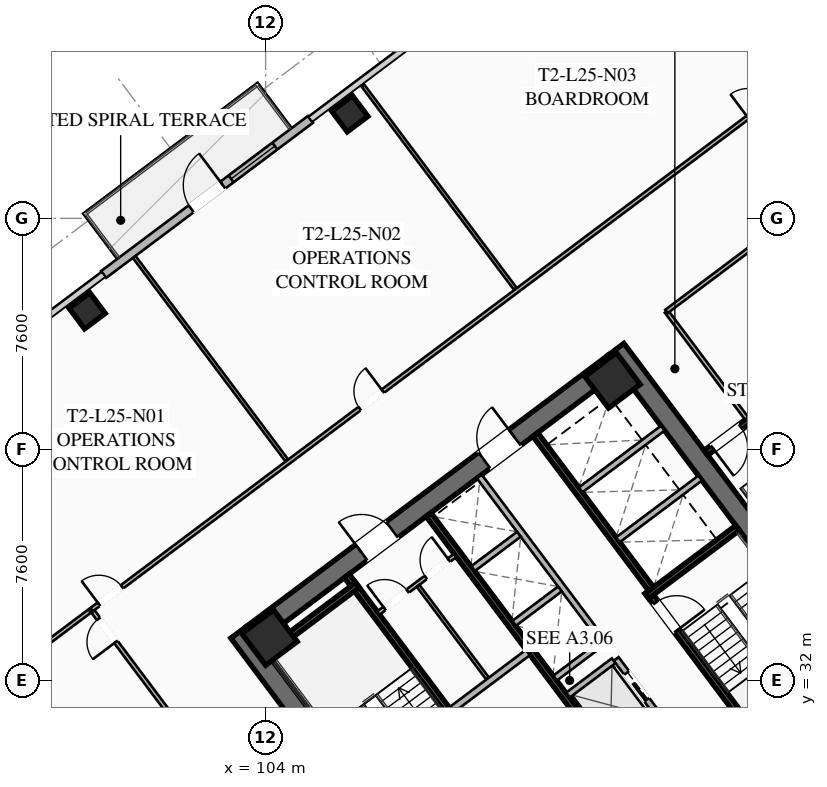
"""IFC4 building model, lengths in metres.
Left out: names, types, materials, properties, quantities, classifications, styles, units other than length and angle.
Written with IfcOpenShell. Run it as: python <this file> out.ifc"""

import sys

from ifc_helpers import new_model, si_unit, direction, frame, frame_2d, origin, origin_2d, place, context, subcontext, project, spatial, rectangle, hollow_rectangle, extrude, element, fill, save


model = new_model("IFC4")
c1 = context("Model", 3, precision=1e-05, world=origin(), true_north=direction((0.0, 1.0)))
c2 = subcontext(c1, "Body", "Model", "MODEL_VIEW")
j1 = project(units=[si_unit("LENGTHUNIT", "METRE"), si_unit("PLANEANGLEUNIT", "RADIAN")], contexts=[c1])
p1 = place(None, origin())
s1 = spatial("IfcSite", under=j1, at=p1, CompositionType="ELEMENT")
p2 = place(p1, origin())
s2 = spatial("IfcBuilding", under=s1, at=p2, CompositionType="ELEMENT")
p3 = place(p2, frame((0.0, 0.0, 95.6)))
s3 = spatial("IfcBuildingStorey", under=s2, at=p3, CompositionType="ELEMENT", Elevation=95.6)
for number, where, z_axis, x_axis in (
    (1, (112.476, 21.107, 0.0), (0.0, 0.0, 1.0), (-0.6, 0.8, 0.0)),
    (2, (115.524, 42.893, 0.0), (0.0, 0.0, 1.0), (0.6, -0.8, 0.0)),
):
    element("IfcWall", number, at=place(p3, frame(where, z_axis=z_axis, x_axis=x_axis)), inside=s3, PredefinedType="SHEAR", context=c2, shape_type="SweptSolid", body=[
        extrude(rectangle(XDim=15.6, YDim=0.65, at=frame_2d((7.8, 0.0))), origin(), (0.0, 0.0, 1.0), 3.55),
    ])
p4 = place(p3, frame((103.571, 33.522, 0.0), z_axis=(0.0, 0.0, 1.0), x_axis=(0.799998028465, 0.600002628705, 0.0)))
e3 = element("IfcWall", 3, at=p4, inside=s3, PredefinedType="SHEAR", context=c2, shape_type="SweptSolid", body=[
    extrude(rectangle(XDim=14.86, YDim=0.65, at=frame_2d((7.43, 0.0))), origin(), (0.0, 0.0, 1.0), 3.55),
])
p5 = place(p4, frame((4.48, 0.0, 0.0)))
e4 = element("IfcOpeningElement", 4, at=p5, cuts=e3, PredefinedType="OPENING", context=c2, shape_type="SweptSolid", body=[
    extrude(rectangle(XDim=1.25, YDim=2.25, at=frame_2d((0.625, 1.125))), frame((0.0, 0.335, 0.0), z_axis=(0.0, -1.0, 0.0), x_axis=(1.0, 0.0, 0.0)), (0.0, 0.0, 1.0), 0.67),
])
p6 = place(p4, frame((9.53, 0.0, 0.0)))
e5 = element("IfcOpeningElement", 5, at=p6, cuts=e3, PredefinedType="OPENING", context=c2, shape_type="SweptSolid", body=[
    extrude(rectangle(XDim=1.25, YDim=2.25, at=frame_2d((0.625, 1.125))), frame((0.0, 0.335, 0.0), z_axis=(0.0, -1.0, 0.0), x_axis=(1.0, 0.0, 0.0)), (0.0, 0.0, 1.0), 0.67),
])
for number, where, z_axis, x_axis in (
    (6, (115.41, 41.87, 0.0), (0.0, 0.0, 1.0), (0.8, 0.6, 0.0)),
    (7, (104.13, 33.41, 0.0), (0.0, 0.0, 1.0), (0.8, 0.6, 0.0)),
):
    element("IfcColumn", number, at=place(p3, frame(where, z_axis=z_axis, x_axis=x_axis)), inside=s3, PredefinedType="COLUMN", context=c2, shape_type="SweptSolid", body=[
        extrude(hollow_rectangle(XDim=1.3, YDim=1.3, WallThickness=0.05, at=origin_2d()), origin(), (0.0, 0.0, 1.0), 3.35),
    ])
for number, where, z_axis, x_axis in (
    (8, (106.77, 50.64, 0.0), (0.0, 0.0, 1.0), (0.8, 0.6, 0.0)),
    (9, (98.13, 44.16, 0.0), (0.0, 0.0, 1.0), (0.8, 0.6, 0.0)),
):
    element("IfcColumn", number, at=place(p3, frame(where, z_axis=z_axis, x_axis=x_axis)), inside=s3, PredefinedType="COLUMN", context=c2, shape_type="SweptSolid", body=[
        extrude(hollow_rectangle(XDim=0.85, YDim=0.85, WallThickness=0.035, at=origin_2d()), origin(), (0.0, 0.0, 1.0), 3.35),
    ])
p7 = place(p3, frame((98.672, 45.354, 0.0), z_axis=(0.0, 0.0, 1.0), x_axis=(0.799986212866, 0.600018382406, 0.0)))
e10 = element("IfcWall", 10, at=p7, inside=s3, PredefinedType="SOLIDWALL", context=c2, shape_type="SweptSolid", body=[
    extrude(rectangle(XDim=8.5, YDim=0.28, at=frame_2d((4.25, 0.0))), origin(), (0.0, 0.0, 1.0), 3.35),
])
p8 = place(p7, frame((3.6, 0.0, 0.0)))
e11 = element("IfcOpeningElement", 11, at=p8, cuts=e10, PredefinedType="OPENING", context=c2, shape_type="SweptSolid", body=[
    extrude(rectangle(XDim=1.3, YDim=2.15, at=frame_2d((0.65, 1.075))), frame((0.0, 0.15, 0.0), z_axis=(0.0, -1.0, 0.0), x_axis=(1.0, 0.0, 0.0)), (0.0, 0.0, 1.0), 0.3),
])
p9 = place(p7, frame((5.24, 0.0, 0.85)))
e12 = element("IfcOpeningElement", 12, at=p9, cuts=e10, PredefinedType="OPENING", context=c2, shape_type="SweptSolid", body=[
    extrude(rectangle(XDim=1.8, YDim=1.92, at=frame_2d((0.9, 0.96))), frame((0.0, 0.15, 0.0), z_axis=(0.0, -1.0, 0.0), x_axis=(1.0, 0.0, 0.0)), (0.0, 0.0, 1.0), 0.3),
])
p10 = place(p3, frame((111.44, 29.08, 0.0), z_axis=(0.0, 0.0, 1.0), x_axis=(-0.600009827119, 0.799992629566, 0.0)))
e13 = element("IfcWall", 13, at=p10, inside=s3, PredefinedType="SHEAR", context=c2, shape_type="SweptSolid", body=[
    extrude(rectangle(XDim=7.95, YDim=0.2, at=frame_2d((3.975, 0.0))), origin(), (0.0, 0.0, 1.0), 3.35),
])
p11 = place(p10, frame((0.45, 0.0, 0.0)))
e14 = element("IfcOpeningElement", 14, at=p11, cuts=e13, PredefinedType="OPENING", context=c2, shape_type="SweptSolid", body=[
    extrude(rectangle(XDim=1.15, YDim=2.2, at=frame_2d((0.575, 1.1))), frame((0.0, 0.11, 0.0), z_axis=(0.0, -1.0, 0.0), x_axis=(1.0, 0.0, 0.0)), (0.0, 0.0, 1.0), 0.22),
])
p12 = place(p3, frame((104.036, 32.902, 0.0), z_axis=(0.0, 0.0, 1.0), x_axis=(0.800039270442, 0.59994763584, 0.0)))
e15 = element("IfcWall", 15, at=p12, inside=s3, PredefinedType="SHEAR", context=c2, shape_type="SweptSolid", body=[
    extrude(rectangle(XDim=3.73, YDim=0.2, at=frame_2d((1.865, 0.0))), origin(), (0.0, 0.0, 1.0), 3.35),
])
p13 = place(p3, frame((116.56, 34.92, 0.0), z_axis=(0.0, 0.0, 1.0), x_axis=(0.600009827119, -0.799992629566, 0.0)))
e16 = element("IfcWall", 16, at=p13, inside=s3, PredefinedType="SHEAR", context=c2, shape_type="SweptSolid", body=[
    extrude(rectangle(XDim=7.95, YDim=0.2, at=frame_2d((3.975, 0.0))), origin(), (0.0, 0.0, 1.0), 3.35),
])
p14 = place(p13, frame((0.45, 0.0, 0.0)))
e17 = element("IfcOpeningElement", 17, at=p14, cuts=e16, PredefinedType="OPENING", context=c2, shape_type="SweptSolid", body=[
    extrude(rectangle(XDim=1.15, YDim=2.2, at=frame_2d((0.575, 1.1))), frame((0.0, 0.11, 0.0), z_axis=(0.0, -1.0, 0.0), x_axis=(1.0, 0.0, 0.0)), (0.0, 0.0, 1.0), 0.22),
])
p15 = place(p3, frame((116.54, 34.78, 0.0), z_axis=(0.0, 0.0, 1.0), x_axis=(0.799984290658, 0.600020945218, 0.0)))
e18 = element("IfcWall", 18, at=p15, inside=s3, PredefinedType="SHEAR", context=c2, shape_type="SweptSolid", body=[
    extrude(rectangle(XDim=3.73, YDim=0.2, at=frame_2d((1.865, 0.0))), origin(), (0.0, 0.0, 1.0), 3.35),
])
p16 = place(p3, frame((117.938, 26.016, 0.0), z_axis=(0.0, 0.0, 1.0), x_axis=(-0.600005463273, 0.799995902516, 0.0)))
e19 = element("IfcWall", 19, at=p16, inside=s3, PredefinedType="SHEAR", context=c2, shape_type="SweptSolid", body=[
    extrude(rectangle(XDim=14.3, YDim=0.2, at=frame_2d((7.15, 0.0))), origin(), (0.0, 0.0, 1.0), 3.35),
])
p17 = place(p3, frame((110.104, 31.028, 0.0), z_axis=(0.0, 0.0, 1.0), x_axis=(0.800018601094, 0.59997519774, 0.0)))
e20 = element("IfcWall", 20, at=p17, inside=s3, PredefinedType="SOLIDWALL", context=c2, shape_type="SweptSolid", body=[
    extrude(rectangle(XDim=3.15, YDim=0.22, at=frame_2d((1.575, 0.0))), origin(), (0.0, 0.0, 1.0), 2.703),
])
p18 = place(p3, frame((112.87, 40.09, 0.0), z_axis=(0.0, 0.0, 1.0), x_axis=(0.599975393228, -0.800018454488, 0.0)))
e21 = element("IfcWall", 21, at=p18, inside=s3, PredefinedType="SHEAR", context=c2, shape_type="SweptSolid", body=[
    extrude(rectangle(XDim=6.35, YDim=0.2, at=frame_2d((3.175, 0.0))), origin(), (0.0, 0.0, 1.0), 3.35),
])
for number, where, z_axis, x_axis in (
    (22, (115.59, 36.63, 0.0), (0.0, 0.0, 1.0), (0.8, 0.6, 0.0)),
    (23, (114.36, 38.27, 0.0), (0.0, 0.0, 1.0), (0.8, 0.6, 0.0)),
):
    element("IfcWall", number, at=place(p3, frame(where, z_axis=z_axis, x_axis=x_axis)), inside=s3, PredefinedType="SOLIDWALL", context=c2, shape_type="SweptSolid", body=[
        extrude(rectangle(XDim=3.38, YDim=0.2, at=frame_2d((1.69, 0.0))), origin(), (0.0, 0.0, 1.0), 3.35),
    ])
p19 = place(p3, frame((107.71, 34.22, 0.0), z_axis=(0.0, 0.0, 1.0), x_axis=(0.799981399002, 0.60002480053, 0.0)))
e24 = element("IfcWall", 24, at=p19, inside=s3, PredefinedType="PARTITIONING", context=c2, shape_type="SweptSolid", body=[
    extrude(rectangle(XDim=3.15, YDim=0.135, at=frame_2d((1.575, 0.0))), origin(), (0.0, 0.0, 1.0), 2.703),
])
p20 = place(p19, frame((0.25, 0.0, 0.0)))
e25 = element("IfcOpeningElement", 25, at=p20, cuts=e24, PredefinedType="OPENING", context=c2, shape_type="SweptSolid", body=[
    extrude(rectangle(XDim=0.95, YDim=2.05, at=frame_2d((0.475, 1.025))), frame((0.0, 0.077, 0.0), z_axis=(0.0, -1.0, 0.0), x_axis=(1.0, 0.0, 0.0)), (0.0, 0.0, 1.0), 0.155),
])
p21 = place(p19, frame((1.95, 0.0, 0.0)))
e26 = element("IfcOpeningElement", 26, at=p21, cuts=e24, PredefinedType="OPENING", context=c2, shape_type="SweptSolid", body=[
    extrude(rectangle(XDim=0.95, YDim=2.05, at=frame_2d((0.475, 1.025))), frame((0.0, 0.077, 0.0), z_axis=(0.0, -1.0, 0.0), x_axis=(1.0, 0.0, 0.0)), (0.0, 0.0, 1.0), 0.155),
])
p22 = place(p3, frame((111.296, 32.072, 0.0), z_axis=(0.0, 0.0, 1.0), x_axis=(-0.59995887973, 0.800030838552, 0.0)))
e27 = element("IfcWall", 27, at=p22, inside=s3, PredefinedType="PARTITIONING", context=c2, shape_type="SweptSolid", body=[
    extrude(rectangle(XDim=3.8, YDim=0.11, at=frame_2d((1.9, 0.0))), origin(), (0.0, 0.0, 1.0), 2.703),
])
p23 = place(p3, frame((119.61, 27.27, 0.0), z_axis=(0.0, 0.0, 1.0), x_axis=(-0.600011488909, 0.79999138319, 0.0)))
e28 = element("IfcWall", 28, at=p23, inside=s3, PredefinedType="SOLIDWALL", context=c2, shape_type="SweptSolid", body=[
    extrude(rectangle(XDim=6.8, YDim=0.2, at=frame_2d((3.4, 0.0))), origin(), (0.0, 0.0, 1.0), 3.35),
])
p24 = place(p23, frame((0.625, 0.0, 0.0)))
e29 = element("IfcOpeningElement", 29, at=p24, cuts=e28, PredefinedType="OPENING", context=c2, shape_type="SweptSolid", body=[
    extrude(rectangle(XDim=1.1, YDim=2.2, at=frame_2d((0.55, 1.1))), frame((0.0, 0.11, 0.0), z_axis=(0.0, -1.0, 0.0), x_axis=(1.0, 0.0, 0.0)), (0.0, 0.0, 1.0), 0.22),
])
p25 = place(p23, frame((2.875, 0.0, 0.0)))
e30 = element("IfcOpeningElement", 30, at=p25, cuts=e28, PredefinedType="OPENING", context=c2, shape_type="SweptSolid", body=[
    extrude(rectangle(XDim=1.1, YDim=2.2, at=frame_2d((0.55, 1.1))), frame((0.0, 0.11, 0.0), z_axis=(0.0, -1.0, 0.0), x_axis=(1.0, 0.0, 0.0)), (0.0, 0.0, 1.0), 0.22),
])
p26 = place(p23, frame((5.125, 0.0, 0.0)))
e31 = element("IfcOpeningElement", 31, at=p26, cuts=e28, PredefinedType="OPENING", context=c2, shape_type="SweptSolid", body=[
    extrude(rectangle(XDim=1.1, YDim=2.2, at=frame_2d((0.55, 1.1))), frame((0.0, 0.11, 0.0), z_axis=(0.0, -1.0, 0.0), x_axis=(1.0, 0.0, 0.0)), (0.0, 0.0, 1.0), 0.22),
])
p27 = place(p3, frame((113.946, 31.522, 0.0), z_axis=(0.0, 0.0, 1.0), x_axis=(0.8, 0.6, 0.0)))
e32 = element("IfcWall", 32, at=p27, inside=s3, PredefinedType="SOLIDWALL", context=c2, shape_type="SweptSolid", body=[
    extrude(rectangle(XDim=1.88, YDim=0.2, at=frame_2d((0.94, 0.0))), origin(), (0.0, 0.0, 1.0), 3.35),
])
p28 = place(p3, frame((115.11, 33.27, 0.0), z_axis=(0.0, 0.0, 1.0), x_axis=(-0.600011488909, 0.79999138319, 0.0)))
e33 = element("IfcWall", 33, at=p28, inside=s3, PredefinedType="SOLIDWALL", context=c2, shape_type="SweptSolid", body=[
    extrude(rectangle(XDim=6.8, YDim=0.2, at=frame_2d((3.4, 0.0))), origin(), (0.0, 0.0, 1.0), 3.35),
])
p29 = place(p3, frame((113.526, 32.082, 0.0), z_axis=(0.0, 0.0, 1.0), x_axis=(0.800046745961, 0.599937666993, 0.0)))
e34 = element("IfcWall", 34, at=p29, inside=s3, PredefinedType="SOLIDWALL", context=c2, shape_type="SweptSolid", body=[
    extrude(rectangle(XDim=1.88, YDim=0.2, at=frame_2d((0.94, 0.0))), origin(), (0.0, 0.0, 1.0), 3.35),
])
p30 = place(p3, frame((112.176, 33.882, 0.0), z_axis=(0.0, 0.0, 1.0), x_axis=(0.8, 0.6, 0.0)))
e35 = element("IfcWall", 35, at=p30, inside=s3, PredefinedType="SOLIDWALL", context=c2, shape_type="SweptSolid", body=[
    extrude(rectangle(XDim=1.88, YDim=0.2, at=frame_2d((0.94, 0.0))), origin(), (0.0, 0.0, 1.0), 3.35),
])
p31 = place(p3, frame((110.826, 35.682, 0.0), z_axis=(0.0, 0.0, 1.0), x_axis=(0.799984418148, 0.600020775241, 0.0)))
e36 = element("IfcWall", 36, at=p31, inside=s3, PredefinedType="SOLIDWALL", context=c2, shape_type="SweptSolid", body=[
    extrude(rectangle(XDim=1.88, YDim=0.2, at=frame_2d((0.94, 0.0))), origin(), (0.0, 0.0, 1.0), 3.35),
])
p32 = place(p3, frame((121.204, 41.528, 0.0), z_axis=(0.0, 0.0, 1.0), x_axis=(-0.800017232136, -0.599977023131, 0.0)))
e37 = element("IfcWall", 37, at=p32, inside=s3, PredefinedType="SHEAR", context=c2, shape_type="SweptSolid", body=[
    extrude(rectangle(XDim=3.4, YDim=0.2, at=frame_2d((1.7, 0.0))), origin(), (0.0, 0.0, 1.0), 3.35),
])
p33 = place(p32, frame((1.975, 0.0, 0.0)))
e38 = element("IfcOpeningElement", 38, at=p33, cuts=e37, PredefinedType="OPENING", context=c2, shape_type="SweptSolid", body=[
    extrude(rectangle(XDim=1.15, YDim=2.2, at=frame_2d((0.575, 1.1))), frame((0.0, 0.11, 0.0), z_axis=(0.0, -1.0, 0.0), x_axis=(1.0, 0.0, 0.0)), (0.0, 0.0, 1.0), 0.22),
])
p34 = place(p3, frame((119.824, 40.618, 0.0), z_axis=(0.0, 0.0, 1.0), x_axis=(-0.599982243973, 0.800013316712, 0.0)))
e39 = element("IfcWall", 39, at=p34, inside=s3, PredefinedType="PARTITIONING", context=c2, shape_type="SweptSolid", body=[
    extrude(rectangle(XDim=4.4, YDim=0.135, at=frame_2d((2.2, 0.0))), origin(), (0.0, 0.0, 1.0), 2.703),
])
p35 = place(p3, frame((98.276, 34.332, 0.0), z_axis=(0.0, 0.0, 1.0), x_axis=(0.800003113347, 0.599995848849, 0.0)))
e40 = element("IfcWall", 40, at=p35, inside=s3, PredefinedType="PARTITIONING", context=c2, shape_type="SweptSolid", body=[
    extrude(rectangle(XDim=28.23, YDim=0.135, at=frame_2d((14.115, 0.0))), origin(), (0.0, 0.0, 1.0), 2.703),
])
p36 = place(p35, frame((0.3, 0.0, 0.0)))
e41 = element("IfcOpeningElement", 41, at=p36, cuts=e40, PredefinedType="OPENING", context=c2, shape_type="SweptSolid", body=[
    extrude(rectangle(XDim=0.95, YDim=2.05, at=frame_2d((0.475, 1.025))), frame((0.0, 0.077, 0.0), z_axis=(0.0, -1.0, 0.0), x_axis=(1.0, 0.0, 0.0)), (0.0, 0.0, 1.0), 0.155),
])
p37 = place(p35, frame((11.023, 0.0, 0.0)))
e42 = element("IfcOpeningElement", 42, at=p37, cuts=e40, PredefinedType="OPENING", context=c2, shape_type="SweptSolid", body=[
    extrude(rectangle(XDim=0.95, YDim=2.05, at=frame_2d((0.475, 1.025))), frame((0.0, 0.077, 0.0), z_axis=(0.0, -1.0, 0.0), x_axis=(1.0, 0.0, 0.0)), (0.0, 0.0, 1.0), 0.155),
])
p38 = place(p35, frame((26.98, 0.0, 0.0)))
e43 = element("IfcOpeningElement", 43, at=p38, cuts=e40, PredefinedType="OPENING", context=c2, shape_type="SweptSolid", body=[
    extrude(rectangle(XDim=0.95, YDim=2.05, at=frame_2d((0.475, 1.025))), frame((0.0, 0.077, 0.0), z_axis=(0.0, -1.0, 0.0), x_axis=(1.0, 0.0, 0.0)), (0.0, 0.0, 1.0), 0.155),
])
p39 = place(p3, frame((104.692, 39.244, 0.0), z_axis=(0.0, 0.0, 1.0), x_axis=(-0.599990643836, 0.800007017038, 0.0)))
e44 = element("IfcWall", 44, at=p39, inside=s3, PredefinedType="PARTITIONING", context=c2, shape_type="SweptSolid", body=[
    extrude(rectangle(XDim=8.35, YDim=0.11, at=frame_2d((4.175, 0.0))), origin(), (0.0, 0.0, 1.0), 2.703),
])
p40 = place(p3, frame((112.212, 44.884, 0.0), z_axis=(0.0, 0.0, 1.0), x_axis=(-0.600004678161, 0.799996491358, 0.0)))
e45 = element("IfcWall", 45, at=p40, inside=s3, PredefinedType="PARTITIONING", context=c2, shape_type="SweptSolid", body=[
    extrude(rectangle(XDim=8.35, YDim=0.11, at=frame_2d((4.175, 0.0))), origin(), (0.0, 0.0, 1.0), 2.703),
])
p41 = place(p3, frame((134.18, 33.51, 0.0), z_axis=(0.0, 0.0, 1.0), x_axis=(-0.8, -0.6, 0.0)))
e46 = element("IfcWall", 46, at=p41, inside=s3, PredefinedType="PARTITIONING", context=c2, shape_type="SweptSolid", body=[
    extrude(rectangle(XDim=28.23, YDim=0.135, at=frame_2d((14.115, 0.0))), origin(), (0.0, 0.0, 1.0), 2.703),
])
p42 = place(p41, frame((26.9, 0.0, 0.0)))
e47 = element("IfcOpeningElement", 47, at=p42, cuts=e46, PredefinedType="OPENING", context=c2, shape_type="SweptSolid", body=[
    extrude(rectangle(XDim=0.95, YDim=2.05, at=frame_2d((0.475, 1.025))), frame((0.0, 0.077, 0.0), z_axis=(0.0, -1.0, 0.0), x_axis=(1.0, 0.0, 0.0)), (0.0, 0.0, 1.0), 0.155),
])
p43 = place(p41, frame((20.314, 0.0, 0.0)))
e48 = element("IfcOpeningElement", 48, at=p43, cuts=e46, PredefinedType="OPENING", context=c2, shape_type="SweptSolid", body=[
    extrude(rectangle(XDim=0.95, YDim=2.05, at=frame_2d((0.475, 1.025))), frame((0.0, 0.077, 0.0), z_axis=(0.0, -1.0, 0.0), x_axis=(1.0, 0.0, 0.0)), (0.0, 0.0, 1.0), 0.155),
])
p44 = place(p41, frame((0.38, 0.0, 0.0)))
e49 = element("IfcOpeningElement", 49, at=p44, cuts=e46, PredefinedType="OPENING", context=c2, shape_type="SweptSolid", body=[
    extrude(rectangle(XDim=0.95, YDim=2.05, at=frame_2d((0.475, 1.025))), frame((0.0, 0.077, 0.0), z_axis=(0.0, -1.0, 0.0), x_axis=(1.0, 0.0, 0.0)), (0.0, 0.0, 1.0), 0.155),
])
p45 = place(p3, frame((125.224, 50.168, 0.0), z_axis=(0.0, 0.0, 1.0), x_axis=(-0.8, -0.6, 0.0)))
e50 = element("IfcWall", 50, at=p45, inside=s3, PredefinedType="PARTITIONING", context=c2, shape_type="SweptSolid", body=[
    extrude(rectangle(XDim=10.05, YDim=0.135, at=frame_2d((5.025, 0.0))), origin(), (0.0, 0.0, 1.0), 2.703),
])
p46 = place(p45, frame((4.9, 0.0, 0.0)))
e51 = element("IfcOpeningElement", 51, at=p46, cuts=e50, PredefinedType="OPENING", context=c2, shape_type="SweptSolid", body=[
    extrude(rectangle(XDim=0.95, YDim=2.05, at=frame_2d((0.475, 1.025))), frame((0.0, 0.077, 0.0), z_axis=(0.0, -1.0, 0.0), x_axis=(1.0, 0.0, 0.0)), (0.0, 0.0, 1.0), 0.155),
])
p47 = place(p3, frame((111.548, 16.636, 0.0), z_axis=(0.0, 0.0, 1.0), x_axis=(-0.600001772333, 0.799998670747, 0.0)))
e52 = element("IfcWall", 52, at=p47, inside=s3, PredefinedType="PARTITIONING", context=c2, shape_type="SweptSolid", body=[
    extrude(rectangle(XDim=22.04, YDim=0.135, at=frame_2d((11.02, 0.0))), origin(), (0.0, 0.0, 1.0), 2.703),
])
p48 = place(p47, frame((20.79, 0.0, 0.0)))
e53 = element("IfcOpeningElement", 53, at=p48, cuts=e52, PredefinedType="OPENING", context=c2, shape_type="SweptSolid", body=[
    extrude(rectangle(XDim=0.95, YDim=2.05, at=frame_2d((0.475, 1.025))), frame((0.0, 0.077, 0.0), z_axis=(0.0, -1.0, 0.0), x_axis=(1.0, 0.0, 0.0)), (0.0, 0.0, 1.0), 0.155),
])
p49 = place(p3, frame((98.212, 34.284, 0.0), z_axis=(0.0, 0.0, 1.0), x_axis=(-0.800006797429, -0.599990936654, 0.0)))
e54 = element("IfcWall", 54, at=p49, inside=s3, PredefinedType="PARTITIONING", context=c2, shape_type="SweptSolid", body=[
    extrude(rectangle(XDim=8.62, YDim=0.135, at=frame_2d((4.31, 0.0))), origin(), (0.0, 0.0, 1.0), 2.703),
])
p50 = place(p8, origin())
e55 = element("IfcDoor", 55, at=p50, inside=s3, OperationType="SINGLE_SWING_RIGHT", PredefinedType="DOOR", context=c2, shape_type="SweptSolid", body=[
    extrude(rectangle(XDim=1.3, YDim=2.15, at=frame_2d((0.65, 1.075))), frame((0.0, 0.025, 0.0), z_axis=(0.0, -1.0, 0.0), x_axis=(1.0, 0.0, 0.0)), (0.0, 0.0, 1.0), 0.05),
])
fill(e11, e55)
p51 = place(p9, origin())
e56 = element("IfcWindow", 56, at=p51, inside=s3, PartitioningType="SINGLE_PANEL", PredefinedType="WINDOW", context=c2, shape_type="SweptSolid", body=[
    extrude(rectangle(XDim=1.8, YDim=1.92, at=frame_2d((0.9, 0.96))), frame((0.0, 0.03, 0.0), z_axis=(0.0, -1.0, 0.0), x_axis=(1.0, 0.0, 0.0)), (0.0, 0.0, 1.0), 0.06),
])
fill(e12, e56)
p52 = place(p5, origin())
e57 = element("IfcDoor", 57, at=p52, inside=s3, OperationType="SINGLE_SWING_LEFT", PredefinedType="DOOR", context=c2, shape_type="SweptSolid", body=[
    extrude(rectangle(XDim=1.25, YDim=2.25, at=frame_2d((0.625, 1.125))), frame((0.0, 0.025, 0.0), z_axis=(0.0, -1.0, 0.0), x_axis=(1.0, 0.0, 0.0)), (0.0, 0.0, 1.0), 0.05),
])
fill(e4, e57)
p53 = place(p6, origin())
e58 = element("IfcDoor", 58, at=p53, inside=s3, OperationType="SINGLE_SWING_RIGHT", PredefinedType="DOOR", context=c2, shape_type="SweptSolid", body=[
    extrude(rectangle(XDim=1.25, YDim=2.25, at=frame_2d((0.625, 1.125))), frame((0.0, 0.025, 0.0), z_axis=(0.0, -1.0, 0.0), x_axis=(1.0, 0.0, 0.0)), (0.0, 0.0, 1.0), 0.05),
])
fill(e5, e58)
p54 = place(p14, origin())
e59 = element("IfcDoor", 59, at=p54, inside=s3, OperationType="SINGLE_SWING_RIGHT", PredefinedType="DOOR", context=c2, shape_type="SweptSolid", body=[
    extrude(rectangle(XDim=1.15, YDim=2.2, at=frame_2d((0.575, 1.1))), frame((0.0, 0.025, 0.0), z_axis=(0.0, -1.0, 0.0), x_axis=(1.0, 0.0, 0.0)), (0.0, 0.0, 1.0), 0.05),
])
fill(e17, e59)
p55 = place(p20, origin())
e60 = element("IfcDoor", 60, at=p55, inside=s3, OperationType="SINGLE_SWING_LEFT", PredefinedType="DOOR", context=c2, shape_type="SweptSolid", body=[
    extrude(rectangle(XDim=0.95, YDim=2.05, at=frame_2d((0.475, 1.025))), frame((0.0, 0.025, 0.0), z_axis=(0.0, -1.0, 0.0), x_axis=(1.0, 0.0, 0.0)), (0.0, 0.0, 1.0), 0.05),
])
fill(e25, e60)
p56 = place(p21, origin())
e61 = element("IfcDoor", 61, at=p56, inside=s3, OperationType="SINGLE_SWING_RIGHT", PredefinedType="DOOR", context=c2, shape_type="SweptSolid", body=[
    extrude(rectangle(XDim=0.95, YDim=2.05, at=frame_2d((0.475, 1.025))), frame((0.0, 0.025, 0.0), z_axis=(0.0, -1.0, 0.0), x_axis=(1.0, 0.0, 0.0)), (0.0, 0.0, 1.0), 0.05),
])
fill(e26, e61)
p57 = place(p33, origin())
e62 = element("IfcDoor", 62, at=p57, inside=s3, OperationType="SINGLE_SWING_RIGHT", PredefinedType="DOOR", context=c2, shape_type="SweptSolid", body=[
    extrude(rectangle(XDim=1.15, YDim=2.2, at=frame_2d((0.575, 1.1))), frame((0.0, 0.025, 0.0), z_axis=(0.0, -1.0, 0.0), x_axis=(1.0, 0.0, 0.0)), (0.0, 0.0, 1.0), 0.05),
])
fill(e38, e62)
p58 = place(p36, origin())
e63 = element("IfcDoor", 63, at=p58, inside=s3, OperationType="SINGLE_SWING_LEFT", PredefinedType="DOOR", context=c2, shape_type="SweptSolid", body=[
    extrude(rectangle(XDim=0.95, YDim=2.05, at=frame_2d((0.475, 1.025))), frame((0.0, 0.025, 0.0), z_axis=(0.0, -1.0, 0.0), x_axis=(1.0, 0.0, 0.0)), (0.0, 0.0, 1.0), 0.05),
])
fill(e41, e63)
p59 = place(p37, origin())
e64 = element("IfcDoor", 64, at=p59, inside=s3, OperationType="SINGLE_SWING_RIGHT", PredefinedType="DOOR", context=c2, shape_type="SweptSolid", body=[
    extrude(rectangle(XDim=0.95, YDim=2.05, at=frame_2d((0.475, 1.025))), frame((0.0, 0.025, 0.0), z_axis=(0.0, -1.0, 0.0), x_axis=(1.0, 0.0, 0.0)), (0.0, 0.0, 1.0), 0.05),
])
fill(e42, e64)
p60 = place(p48, origin())
e65 = element("IfcDoor", 65, at=p60, inside=s3, OperationType="SINGLE_SWING_LEFT", PredefinedType="DOOR", context=c2, shape_type="SweptSolid", body=[
    extrude(rectangle(XDim=0.95, YDim=2.05, at=frame_2d((0.475, 1.025))), frame((0.0, 0.025, 0.0), z_axis=(0.0, -1.0, 0.0), x_axis=(1.0, 0.0, 0.0)), (0.0, 0.0, 1.0), 0.05),
])
fill(e53, e65)
p61 = place(p26, origin())
e66 = element("IfcDoor", 66, at=p61, inside=s3, OperationType="SLIDING_TO_LEFT", PredefinedType="DOOR", context=c2, shape_type="SweptSolid", body=[
    extrude(rectangle(XDim=1.1, YDim=2.2, at=frame_2d((0.55, 1.1))), frame((0.0, 0.025, 0.0), z_axis=(0.0, -1.0, 0.0), x_axis=(1.0, 0.0, 0.0)), (0.0, 0.0, 1.0), 0.05),
])
fill(e31, e66)
save(model, sys.argv[1])
